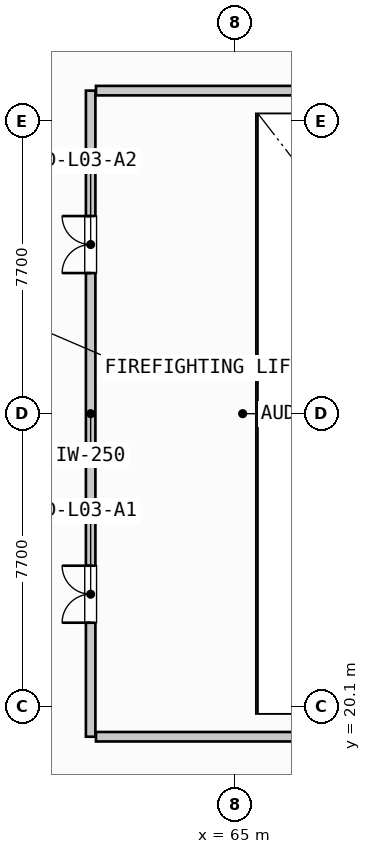
"""IFC4 building model, lengths in metres.
Left out: names, types, materials, properties, quantities, classifications, styles, units other than length and angle.
Written with IfcOpenShell. Run it as: python <this file> out.ifc"""

import sys

from ifc_helpers import new_model, si_unit, direction, frame, frame_2d, origin, place, context, subcontext, project, spatial, rectangle, extrude, source, transform, mapped, element, fill, save


model = new_model("IFC4")
c1 = context("Model", 3, precision=1e-05, world=origin(), true_north=direction((0.0, 1.0)))
c2 = subcontext(c1, "Body", "Model", "MODEL_VIEW")
j1 = project(units=[si_unit("LENGTHUNIT", "METRE"), si_unit("PLANEANGLEUNIT", "RADIAN")], contexts=[c1])
p1 = place(None, origin())
s1 = spatial("IfcSite", under=j1, at=p1, CompositionType="ELEMENT")
p2 = place(p1, origin())
s2 = spatial("IfcBuilding", under=s1, at=p2, CompositionType="ELEMENT")
p3 = place(p2, frame((0.0, 0.0, 14.8)))
s3 = spatial("IfcBuildingStorey", under=s2, at=p3, CompositionType="ELEMENT", Elevation=14.8)
p4 = place(p3, frame((61.2, 19.3, 0.0), z_axis=(0.0, 0.0, 1.0), x_axis=(0.0, 1.0, 0.0)))
e1 = element("IfcWall", 1, at=p4, inside=s3, PredefinedType="SOLIDWALL", context=c2, shape_type="SweptSolid", body=[
    extrude(rectangle(XDim=17.0, YDim=0.25, at=frame_2d((8.5, 0.0))), origin(), (0.0, 0.0, 1.0), 3.743),
])
p5 = place(p4, frame((3.0, 0.0, 0.0)))
e2 = element("IfcOpeningElement", 2, at=p5, cuts=e1, PredefinedType="OPENING", context=c2, shape_type="SweptSolid", body=[
    extrude(rectangle(XDim=1.5, YDim=2.2, at=frame_2d((0.75, 1.1))), frame((0.0, 0.135, 0.0), z_axis=(0.0, -1.0, 0.0), x_axis=(1.0, 0.0, 0.0)), (0.0, 0.0, 1.0), 0.27),
])
p6 = place(p4, frame((12.2, 0.0, 0.0)))
e3 = element("IfcOpeningElement", 3, at=p6, cuts=e1, PredefinedType="OPENING", context=c2, shape_type="SweptSolid", body=[
    extrude(rectangle(XDim=1.5, YDim=2.2, at=frame_2d((0.75, 1.1))), frame((0.0, 0.135, 0.0), z_axis=(0.0, -1.0, 0.0), x_axis=(1.0, 0.0, 0.0)), (0.0, 0.0, 1.0), 0.27),
])
for number, where, z_axis, x_axis in (
    (4, (61.34, 19.3, 0.0), (0.0, 0.0, 1.0), (1.0, 0.0, 0.0)),
    (5, (61.34, 36.3, 0.0), (0.0, 0.0, 1.0), (1.0, 0.0, 0.0)),
):
    element("IfcWall", number, at=place(p3, frame(where, z_axis=z_axis, x_axis=x_axis)), inside=s3, PredefinedType="SOLIDWALL", context=c2, shape_type="SweptSolid", body=[
        extrude(rectangle(XDim=16.92, YDim=0.25, at=frame_2d((8.46, 0.0))), origin(), (0.0, 0.0, 1.0), 3.743),
    ])
m1 = source(origin(), c2, "Body", "SweptSolid", [
    extrude(rectangle(XDim=1.5, YDim=2.2, at=frame_2d((0.75, 1.1))), frame((0.0, 0.025, 0.0), z_axis=(0.0, -1.0, 0.0), x_axis=(1.0, 0.0, 0.0)), (0.0, 0.0, 1.0), 0.05),
])
p7 = place(p5, origin())
e6 = element("IfcDoor", 6, at=p7, inside=s3, OperationType="DOUBLE_DOOR_SINGLE_SWING", PredefinedType="DOOR", context=c2, shape_type="MappedRepresentation", body=[
    mapped(m1, transform((0.0, 0.0, 0.0), scale=1.0)),
])
fill(e2, e6)
p8 = place(p6, origin())
e7 = element("IfcDoor", 7, at=p8, inside=s3, OperationType="DOUBLE_DOOR_SINGLE_SWING", PredefinedType="DOOR", context=c2, shape_type="MappedRepresentation", body=[
    mapped(m1, transform((0.0, 0.0, 0.0), scale=1.0)),
])
fill(e3, e7)
save(model, sys.argv[1])
